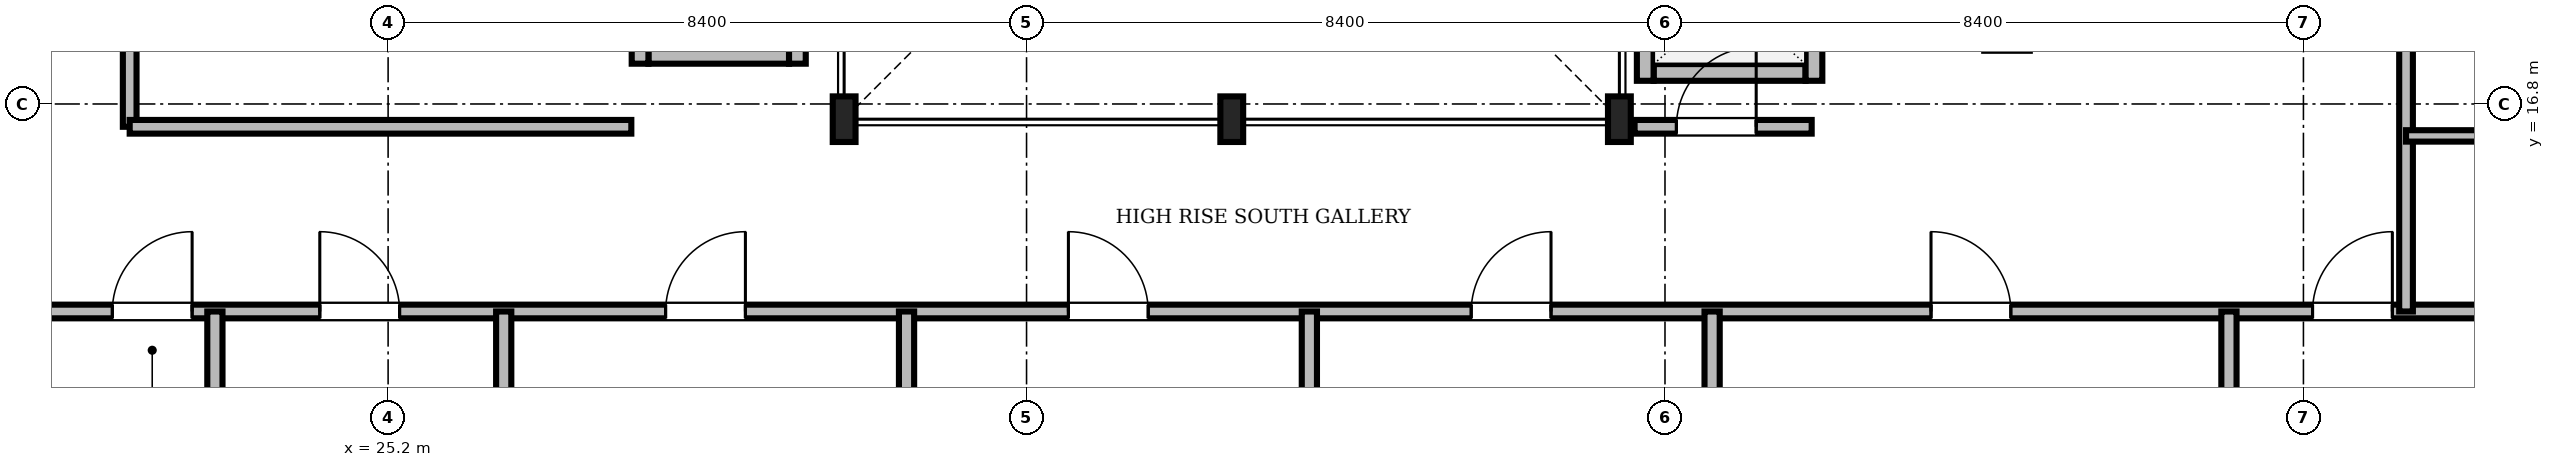
"""IFC4 building model, lengths in metres.
Left out: names, types, materials, properties, quantities, classifications, styles, units other than length and angle.
Written with IfcOpenShell. Run it as: python <this file> out.ifc"""

import sys

from ifc_helpers import new_model, si_unit, direction, frame, frame_2d, origin, origin_2d, place, context, subcontext, project, spatial, rectangle, i_section, extrude, source, transform, mapped, element, fill, save


model = new_model("IFC4")
c1 = context("Model", 3, precision=1e-05, world=origin(), true_north=direction((0.0, 1.0)))
c2 = subcontext(c1, "Body", "Model", "MODEL_VIEW")
j1 = project(units=[si_unit("LENGTHUNIT", "METRE"), si_unit("PLANEANGLEUNIT", "RADIAN")], contexts=[c1])
p1 = place(None, origin())
s1 = spatial("IfcSite", under=j1, at=p1, CompositionType="ELEMENT")
p2 = place(p1, origin())
s2 = spatial("IfcBuilding", under=s1, at=p2, CompositionType="ELEMENT")
p3 = place(p2, frame((0.0, 0.0, 258.5)))
s3 = spatial("IfcBuildingStorey", under=s2, at=p3, CompositionType="ELEMENT", Elevation=258.5)
m1 = source(origin(), c2, "Body", "SweptSolid", [
    extrude(i_section(OverallWidth=0.3, OverallDepth=0.6, WebThickness=0.015, FlangeThickness=0.03, FilletRadius=0.027, at=origin_2d()), origin(), (0.0, 0.0, 1.0), 3.65),
])
for number, where, z_axis, x_axis in (
    (1, (31.2, 16.6, 0.0), (0.0, 0.0, 1.0), (1.0, 0.0, 0.0)),
    (2, (36.3, 16.6, 0.0), (0.0, 0.0, 1.0), (1.0, 0.0, 0.0)),
    (3, (41.4, 16.6, 0.0), (0.0, 0.0, 1.0), (1.0, 0.0, 0.0)),
):
    element("IfcColumn", number, at=place(p3, frame(where, z_axis=z_axis, x_axis=x_axis)), inside=s3, PredefinedType="COLUMN", context=c2, shape_type="MappedRepresentation", body=[
        mapped(m1, transform((0.0, 0.0, 0.0), scale=1.0)),
    ])
m2 = source(origin(), c2, "Body", "SweptSolid", [
    extrude(rectangle(XDim=2.0, YDim=0.22, at=frame_2d((1.0, 0.0))), origin(), (0.0, 0.0, 1.0), 3.65),
])
p4 = place(p3, frame((41.85, 17.215, 0.0), z_axis=(0.0, 0.0, 1.0), x_axis=(1.0, 0.0, 0.0)))
e4 = element("IfcWall", 4, at=p4, inside=s3, PredefinedType="SOLIDWALL", context=c2, shape_type="MappedRepresentation", body=[
    mapped(m2, transform((0.0, 0.0, 0.0), scale=1.0)),
])
m3 = source(origin(), c2, "Body", "SweptSolid", [
    extrude(rectangle(XDim=2.19, YDim=0.22, at=frame_2d((1.095, 0.0))), origin(), (0.0, 0.0, 1.0), 3.65),
])
p5 = place(p3, frame((41.74, 17.105, 0.0), z_axis=(0.0, 0.0, 1.0), x_axis=(0.0, 1.0, 0.0)))
e5 = element("IfcWall", 5, at=p5, inside=s3, PredefinedType="SOLIDWALL", context=c2, shape_type="MappedRepresentation", body=[
    mapped(m3, transform((0.0, 0.0, 0.0), scale=1.0)),
])
p6 = place(p3, frame((43.96, 17.105, 0.0), z_axis=(0.0, 0.0, 1.0), x_axis=(0.0, 1.0, 0.0)))
e6 = element("IfcWall", 6, at=p6, inside=s3, PredefinedType="SOLIDWALL", context=c2, shape_type="MappedRepresentation", body=[
    mapped(m3, transform((0.0, 0.0, 0.0), scale=1.0)),
])
m4 = source(origin(), c2, "Body", "SweptSolid", [
    extrude(rectangle(XDim=1.1, YDim=2.2, at=frame_2d((0.55, 1.1))), frame((0.0, 0.12, 0.0), z_axis=(0.0, -1.0, 0.0), x_axis=(1.0, 0.0, 0.0)), (0.0, 0.0, 1.0), 0.24),
])
p7 = place(p6, frame((0.545, 0.0, 0.0)))
e7 = element("IfcOpeningElement", 7, at=p7, cuts=e6, PredefinedType="OPENING", context=c2, shape_type="MappedRepresentation", body=[
    mapped(m4, transform((0.0, 0.0, 0.0), scale=1.0)),
])
m5 = source(origin(), c2, "Body", "SweptSolid", [
    extrude(rectangle(XDim=1.85, YDim=0.22, at=frame_2d((0.925, 0.0))), origin(), (0.0, 0.0, 1.0), 3.65),
])
p8 = place(p3, frame((28.625, 17.44, 0.0), z_axis=(0.0, 0.0, 1.0), x_axis=(1.0, 0.0, 0.0)))
e8 = element("IfcWall", 8, at=p8, inside=s3, PredefinedType="SOLIDWALL", context=c2, shape_type="MappedRepresentation", body=[
    mapped(m5, transform((0.0, 0.0, 0.0), scale=1.0)),
])
m6 = source(origin(), c2, "Body", "SweptSolid", [
    extrude(rectangle(XDim=2.54, YDim=0.22, at=frame_2d((1.27, 0.0))), origin(), (0.0, 0.0, 1.0), 3.65),
])
for number, where, z_axis, x_axis in (
    (9, (28.515, 17.33, 0.0), (0.0, 0.0, 1.0), (0.0, 1.0, 0.0)),
    (10, (30.585, 17.33, 0.0), (0.0, 0.0, 1.0), (0.0, 1.0, 0.0)),
):
    element("IfcWall", number, at=place(p3, frame(where, z_axis=z_axis, x_axis=x_axis)), inside=s3, PredefinedType="SOLIDWALL", context=c2, shape_type="MappedRepresentation", body=[
        mapped(m6, transform((0.0, 0.0, 0.0), scale=1.0)),
    ])
m7 = source(origin(), c2, "Body", "SweptSolid", [
    extrude(rectangle(XDim=45.076, YDim=0.18, at=frame_2d((22.538, 0.0))), origin(), (0.0, 0.0, 1.0), 2.892),
])
p9 = place(p3, frame((16.462, 14.07, 0.0), z_axis=(0.0, 0.0, 1.0), x_axis=(1.0, 0.0, 0.0)))
e11 = element("IfcWall", 11, at=p9, inside=s3, PredefinedType="PARTITIONING", context=c2, shape_type="MappedRepresentation", body=[
    mapped(m7, transform((0.0, 0.0, 0.0), scale=1.0)),
])
m8 = source(origin(), c2, "Body", "SweptSolid", [
    extrude(rectangle(XDim=1.05, YDim=2.2, at=frame_2d((0.525, 1.1))), frame((0.0, 0.1, 0.0), z_axis=(0.0, -1.0, 0.0), x_axis=(1.0, 0.0, 0.0)), (0.0, 0.0, 1.0), 0.2),
])
p10 = place(p9, frame((5.109, 0.0, 0.0)))
e12 = element("IfcOpeningElement", 12, at=p10, cuts=e11, PredefinedType="OPENING", context=c2, shape_type="MappedRepresentation", body=[
    mapped(m8, transform((0.0, 0.0, 0.0), scale=1.0)),
])
p11 = place(p9, frame((7.839, 0.0, 0.0)))
e13 = element("IfcOpeningElement", 13, at=p11, cuts=e11, PredefinedType="OPENING", context=c2, shape_type="MappedRepresentation", body=[
    mapped(m8, transform((0.0, 0.0, 0.0), scale=1.0)),
])
p12 = place(p9, frame((12.389, 0.0, 0.0)))
e14 = element("IfcOpeningElement", 14, at=p12, cuts=e11, PredefinedType="OPENING", context=c2, shape_type="MappedRepresentation", body=[
    mapped(m8, transform((0.0, 0.0, 0.0), scale=1.0)),
])
p13 = place(p9, frame((17.689, 0.0, 0.0)))
e15 = element("IfcOpeningElement", 15, at=p13, cuts=e11, PredefinedType="OPENING", context=c2, shape_type="MappedRepresentation", body=[
    mapped(m8, transform((0.0, 0.0, 0.0), scale=1.0)),
])
p14 = place(p9, frame((22.988, 0.0, 0.0)))
e16 = element("IfcOpeningElement", 16, at=p14, cuts=e11, PredefinedType="OPENING", context=c2, shape_type="MappedRepresentation", body=[
    mapped(m8, transform((0.0, 0.0, 0.0), scale=1.0)),
])
p15 = place(p9, frame((29.038, 0.0, 0.0)))
e17 = element("IfcOpeningElement", 17, at=p15, cuts=e11, PredefinedType="OPENING", context=c2, shape_type="MappedRepresentation", body=[
    mapped(m8, transform((0.0, 0.0, 0.0), scale=1.0)),
])
p16 = place(p9, frame((34.058, 0.0, 0.0)))
e18 = element("IfcOpeningElement", 18, at=p16, cuts=e11, PredefinedType="OPENING", context=c2, shape_type="MappedRepresentation", body=[
    mapped(m8, transform((0.0, 0.0, 0.0), scale=1.0)),
])
m9 = source(origin(), c2, "Body", "SweptSolid", [
    extrude(rectangle(XDim=27.03, YDim=0.18, at=frame_2d((13.515, 0.0))), origin(), (0.0, 0.0, 1.0), 3.092),
])
p17 = place(p3, frame((51.75, 14.07, 0.0), z_axis=(0.0, 0.0, 1.0), x_axis=(0.0, 1.0, 0.0)))
e19 = element("IfcWall", 19, at=p17, inside=s3, PredefinedType="PARTITIONING", context=c2, shape_type="MappedRepresentation", body=[
    mapped(m9, transform((0.0, 0.0, 0.0), scale=1.0)),
])
p18 = place(p17, frame((5.133, 0.0, 0.0)))
e20 = element("IfcOpeningElement", 20, at=p18, cuts=e19, PredefinedType="OPENING", context=c2, shape_type="MappedRepresentation", body=[
    mapped(m8, transform((0.0, 0.0, 0.0), scale=1.0)),
])
p19 = place(p17, frame((14.07, 0.0, 0.0)))
e21 = element("IfcOpeningElement", 21, at=p19, cuts=e19, PredefinedType="OPENING", context=c2, shape_type="MappedRepresentation", body=[
    mapped(m8, transform((0.0, 0.0, 0.0), scale=1.0)),
])
p20 = place(p17, frame((23.007, 0.0, 0.0)))
e22 = element("IfcOpeningElement", 22, at=p20, cuts=e19, PredefinedType="OPENING", context=c2, shape_type="MappedRepresentation", body=[
    mapped(m8, transform((0.0, 0.0, 0.0), scale=1.0)),
])
m10 = source(origin(), c2, "Body", "SweptSolid", [
    extrude(rectangle(XDim=11.94, YDim=0.18, at=frame_2d((5.97, 0.0))), origin(), (0.0, 0.0, 1.0), 3.092),
])
p21 = place(p3, frame((21.8, 16.5, 0.0), z_axis=(0.0, 0.0, 1.0), x_axis=(0.0, 1.0, 0.0)))
e23 = element("IfcWall", 23, at=p21, inside=s3, PredefinedType="PARTITIONING", context=c2, shape_type="MappedRepresentation", body=[
    mapped(m10, transform((0.0, 0.0, 0.0), scale=1.0)),
])
p22 = place(p21, frame((4.5, 0.0, 0.0)))
e24 = element("IfcOpeningElement", 24, at=p22, cuts=e23, PredefinedType="OPENING", context=c2, shape_type="MappedRepresentation", body=[
    mapped(m8, transform((0.0, 0.0, 0.0), scale=1.0)),
])
m11 = source(origin(), c2, "Body", "SweptSolid", [
    extrude(rectangle(XDim=2.33, YDim=0.18, at=frame_2d((1.165, 0.0))), origin(), (0.0, 0.0, 1.0), 3.092),
])
p23 = place(p3, frame((41.6, 16.5, 0.0), z_axis=(0.0, 0.0, 1.0), x_axis=(1.0, 0.0, 0.0)))
e25 = element("IfcWall", 25, at=p23, inside=s3, PredefinedType="PARTITIONING", context=c2, shape_type="MappedRepresentation", body=[
    mapped(m11, transform((0.0, 0.0, 0.0), scale=1.0)),
])
p24 = place(p23, frame((0.55, 0.0, 0.0)))
e26 = element("IfcOpeningElement", 26, at=p24, cuts=e25, PredefinedType="OPENING", context=c2, shape_type="MappedRepresentation", body=[
    mapped(m8, transform((0.0, 0.0, 0.0), scale=1.0)),
])
m12 = source(origin(), c2, "Body", "SweptSolid", [
    extrude(rectangle(XDim=11.408, YDim=0.2, at=frame_2d((5.704, 0.0))), origin(), (0.0, 0.0, 1.0), 2.892),
])
for number, where, z_axis, x_axis in (
    (27, (22.921, 2.662, 0.0), (0.0, 0.0, 1.0), (0.0, 1.0, 0.0)),
    (28, (26.721, 2.662, 0.0), (0.0, 0.0, 1.0), (0.0, 1.0, 0.0)),
    (29, (32.021, 2.662, 0.0), (0.0, 0.0, 1.0), (0.0, 1.0, 0.0)),
):
    element("IfcWall", number, at=place(p3, frame(where, z_axis=z_axis, x_axis=x_axis)), inside=s3, PredefinedType="PARTITIONING", context=c2, shape_type="MappedRepresentation", body=[
        mapped(m12, transform((0.0, 0.0, 0.0), scale=1.0)),
    ])
m13 = source(origin(), c2, "Body", "SweptSolid", [
    extrude(rectangle(XDim=11.6, YDim=0.2, at=frame_2d((5.8, 0.0))), origin(), (0.0, 0.0, 1.0), 2.892),
])
p25 = place(p3, frame((37.321, 2.47, 0.0), z_axis=(0.0, 0.0, 1.0), x_axis=(0.0, 1.0, 0.0)))
e30 = element("IfcWall", 30, at=p25, inside=s3, PredefinedType="PARTITIONING", context=c2, shape_type="MappedRepresentation", body=[
    mapped(m13, transform((0.0, 0.0, 0.0), scale=1.0)),
])
for number, where, z_axis, x_axis in (
    (31, (42.62, 2.662, 0.0), (0.0, 0.0, 1.0), (0.0, 1.0, 0.0)),
    (32, (49.42, 2.662, 0.0), (0.0, 0.0, 1.0), (0.0, 1.0, 0.0)),
):
    element("IfcWall", number, at=place(p3, frame(where, z_axis=z_axis, x_axis=x_axis)), inside=s3, PredefinedType="PARTITIONING", context=c2, shape_type="MappedRepresentation", body=[
        mapped(m12, transform((0.0, 0.0, 0.0), scale=1.0)),
    ])
m14 = source(origin(), c2, "Body", "SweptSolid", [
    extrude(rectangle(XDim=6.6, YDim=0.18, at=frame_2d((3.3, 0.0))), origin(), (0.0, 0.0, 1.0), 3.65),
])
p26 = place(p3, frame((21.8, 16.5, 0.0), z_axis=(0.0, 0.0, 1.0), x_axis=(1.0, 0.0, 0.0)))
e33 = element("IfcWall", 33, at=p26, inside=s3, PredefinedType="PARTITIONING", context=c2, shape_type="MappedRepresentation", body=[
    mapped(m14, transform((0.0, 0.0, 0.0), scale=1.0)),
])
m15 = source(origin(), c2, "Body", "SweptSolid", [
    extrude(rectangle(XDim=2.36, YDim=0.15, at=frame_2d((1.18, 0.0))), origin(), (0.0, 0.0, 1.0), 3.65),
])
p27 = place(p3, frame((51.75, 16.38, 0.0), z_axis=(0.0, 0.0, 1.0), x_axis=(1.0, 0.0, 0.0)))
e34 = element("IfcWall", 34, at=p27, inside=s3, PredefinedType="PARTITIONING", context=c2, shape_type="MappedRepresentation", body=[
    mapped(m15, transform((0.0, 0.0, 0.0), scale=1.0)),
])
m16 = source(origin(), c2, "Body", "SweptSolid", [
    extrude(rectangle(XDim=1.05, YDim=2.2, at=frame_2d((0.525, 1.1))), frame((0.0, 0.025, 0.0), z_axis=(0.0, -1.0, 0.0), x_axis=(1.0, 0.0, 0.0)), (0.0, 0.0, 1.0), 0.05),
])
p28 = place(p10, origin())
e35 = element("IfcDoor", 35, at=p28, inside=s3, OperationType="SINGLE_SWING_RIGHT", PredefinedType="DOOR", context=c2, shape_type="MappedRepresentation", body=[
    mapped(m16, transform((0.0, 0.0, 0.0), scale=1.0)),
])
fill(e12, e35)
p29 = place(p11, origin())
e36 = element("IfcDoor", 36, at=p29, inside=s3, OperationType="SINGLE_SWING_LEFT", PredefinedType="DOOR", context=c2, shape_type="MappedRepresentation", body=[
    mapped(m16, transform((0.0, 0.0, 0.0), scale=1.0)),
])
fill(e13, e36)
p30 = place(p12, origin())
e37 = element("IfcDoor", 37, at=p30, inside=s3, OperationType="SINGLE_SWING_RIGHT", PredefinedType="DOOR", context=c2, shape_type="MappedRepresentation", body=[
    mapped(m16, transform((0.0, 0.0, 0.0), scale=1.0)),
])
fill(e14, e37)
p31 = place(p13, origin())
e38 = element("IfcDoor", 38, at=p31, inside=s3, OperationType="SINGLE_SWING_LEFT", PredefinedType="DOOR", context=c2, shape_type="MappedRepresentation", body=[
    mapped(m16, transform((0.0, 0.0, 0.0), scale=1.0)),
])
fill(e15, e38)
p32 = place(p14, origin())
e39 = element("IfcDoor", 39, at=p32, inside=s3, OperationType="SINGLE_SWING_RIGHT", PredefinedType="DOOR", context=c2, shape_type="MappedRepresentation", body=[
    mapped(m16, transform((0.0, 0.0, 0.0), scale=1.0)),
])
fill(e16, e39)
p33 = place(p15, origin())
e40 = element("IfcDoor", 40, at=p33, inside=s3, OperationType="SINGLE_SWING_LEFT", PredefinedType="DOOR", context=c2, shape_type="MappedRepresentation", body=[
    mapped(m16, transform((0.0, 0.0, 0.0), scale=1.0)),
])
fill(e17, e40)
p34 = place(p16, origin())
e41 = element("IfcDoor", 41, at=p34, inside=s3, OperationType="SINGLE_SWING_RIGHT", PredefinedType="DOOR", context=c2, shape_type="MappedRepresentation", body=[
    mapped(m16, transform((0.0, 0.0, 0.0), scale=1.0)),
])
fill(e18, e41)
p35 = place(p24, origin())
e42 = element("IfcDoor", 42, at=p35, inside=s3, OperationType="SINGLE_SWING_RIGHT", PredefinedType="DOOR", context=c2, shape_type="MappedRepresentation", body=[
    mapped(m16, transform((0.0, 0.0, 0.0), scale=1.0)),
])
fill(e26, e42)
save(model, sys.argv[1])
